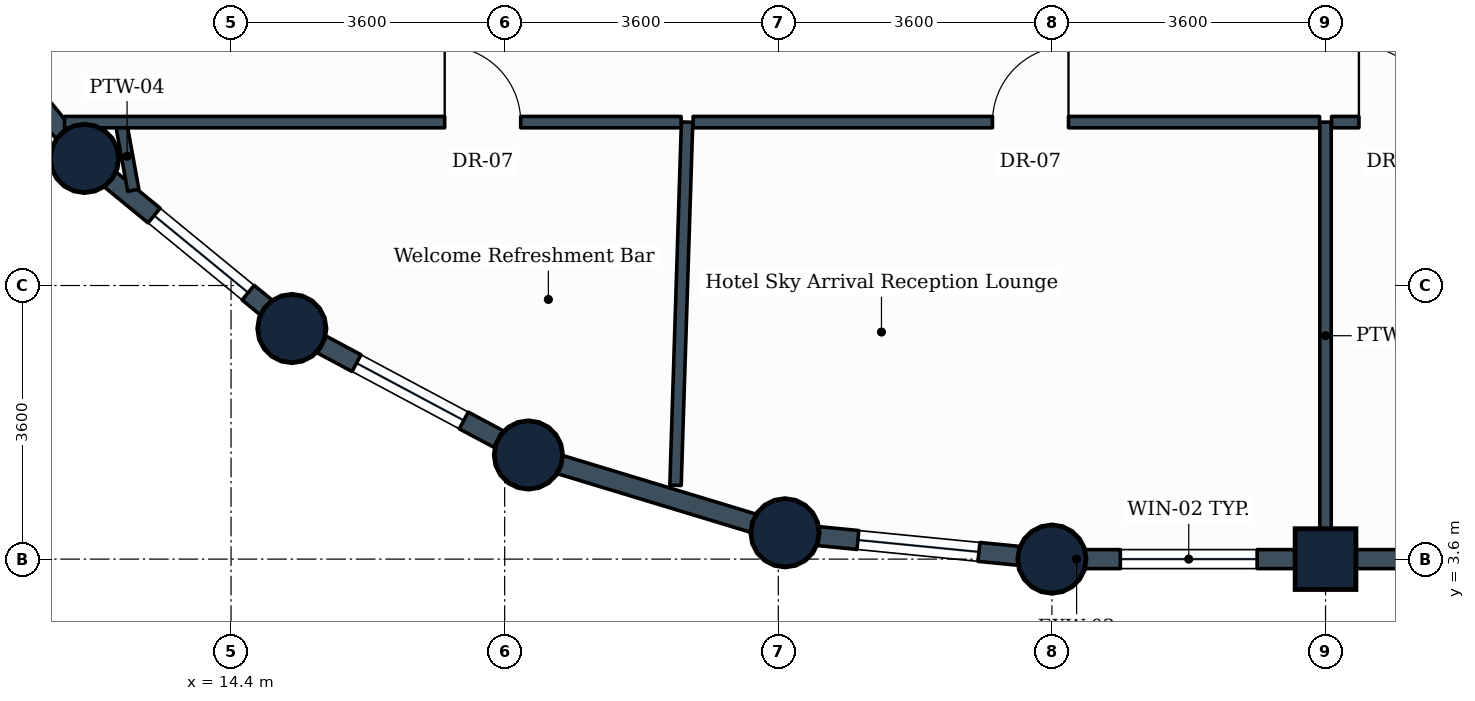
"""IFC4 building model, lengths in metres.
Left out: names, types, materials, properties, quantities, classifications, styles, units other than length and angle.
Written with IfcOpenShell. Run it as: python <this file> out.ifc"""

import sys

from ifc_helpers import new_model, si_unit, direction, frame, frame_2d, origin, origin_2d, place, context, subcontext, project, spatial, rectangle, circle, extrude, element, fill, save


model = new_model("IFC4")
c1 = context("Model", 3, precision=1e-05, world=origin(), true_north=direction((0.0, 1.0)))
c2 = subcontext(c1, "Body", "Model", "MODEL_VIEW")
j1 = project(units=[si_unit("LENGTHUNIT", "METRE"), si_unit("PLANEANGLEUNIT", "RADIAN")], contexts=[c1])
p1 = place(None, origin())
s1 = spatial("IfcSite", under=j1, at=p1, CompositionType="ELEMENT")
p2 = place(p1, origin())
s2 = spatial("IfcBuilding", under=s1, at=p2, CompositionType="ELEMENT")
p3 = place(p2, frame((0.0, 0.0, 221.0)))
s3 = spatial("IfcBuildingStorey", under=s2, at=p3, CompositionType="ELEMENT", Elevation=221.0)
for number, where, z_axis, x_axis in (
    (1, (12.472, 8.872, 0.0), (0.0, 0.0, 1.0), (1.0, 0.0, 0.0)),
    (2, (15.2, 6.634, 0.0), (0.0, 0.0, 1.0), (1.0, 0.0, 0.0)),
    (3, (18.312, 4.97, 0.0), (0.0, 0.0, 1.0), (1.0, 0.0, 0.0)),
    (4, (21.688, 3.946, 0.0), (0.0, 0.0, 1.0), (1.0, 0.0, 0.0)),
    (5, (25.2, 3.6, 0.0), (0.0, 0.0, 1.0), (1.0, 0.0, 0.0)),
):
    element("IfcColumn", number, at=place(p3, frame(where, z_axis=z_axis, x_axis=x_axis)), inside=s3, PredefinedType="COLUMN", context=c2, shape_type="SweptSolid", body=[
        extrude(circle(Radius=0.45, at=origin_2d()), origin(), (0.0, 0.0, 1.0), 3.6),
    ])
p4 = place(p3, frame((28.8, 3.6, 0.0), z_axis=(0.0, 0.0, 1.0), x_axis=(1.0, 0.0, 0.0)))
e6 = element("IfcColumn", 6, at=p4, inside=s3, PredefinedType="COLUMN", context=c2, shape_type="SweptSolid", body=[
    extrude(rectangle(XDim=0.8, YDim=0.8, at=origin_2d()), origin(), (0.0, 0.0, 1.0), 3.6),
])
p5 = place(p3, frame((28.8, 3.6, 0.0), z_axis=(0.0, 0.0, 1.0), x_axis=(-1.0, 0.0, 0.0)))
e7 = element("IfcWall", 7, at=p5, inside=s3, PredefinedType="STANDARD", context=c2, shape_type="SweptSolid", body=[
    extrude(rectangle(XDim=3.6, YDim=0.25, at=frame_2d((1.8, 0.0))), origin(), (0.0, 0.0, 1.0), 2.83),
])
p6 = place(p5, frame((0.9, 0.0, 0.85)))
e8 = element("IfcOpeningElement", 8, at=p6, cuts=e7, PredefinedType="OPENING", context=c2, shape_type="SweptSolid", body=[
    extrude(rectangle(XDim=1.8, YDim=1.35, at=frame_2d((0.9, 0.675))), frame((0.0, 0.135, 0.0), z_axis=(0.0, -1.0, 0.0), x_axis=(1.0, 0.0, 0.0)), (0.0, 0.0, 1.0), 0.27),
])
p7 = place(p3, frame((32.4, 3.6, 0.0), z_axis=(0.0, 0.0, 1.0), x_axis=(-1.0, 0.0, 0.0)))
e9 = element("IfcWall", 9, at=p7, inside=s3, PredefinedType="STANDARD", context=c2, shape_type="SweptSolid", body=[
    extrude(rectangle(XDim=3.6, YDim=0.25, at=frame_2d((1.8, 0.0))), origin(), (0.0, 0.0, 1.0), 2.83),
])
p8 = place(p3, frame((12.472, 8.872, 0.0), z_axis=(0.0, 0.0, 1.0), x_axis=(-0.634258295121, 0.773121216285, 0.0)))
e10 = element("IfcWall", 10, at=p8, inside=s3, PredefinedType="STANDARD", context=c2, shape_type="SweptSolid", body=[
    extrude(rectangle(XDim=3.529, YDim=0.25, at=frame_2d((1.764, 0.0))), origin(), (0.0, 0.0, 1.0), 2.83),
])
p9 = place(p8, frame((0.964, 0.0, 0.85)))
e11 = element("IfcOpeningElement", 11, at=p9, cuts=e10, PredefinedType="OPENING", context=c2, shape_type="SweptSolid", body=[
    extrude(rectangle(XDim=1.6, YDim=1.35, at=frame_2d((0.8, 0.675))), frame((0.0, 0.135, 0.0), z_axis=(0.0, -1.0, 0.0), x_axis=(1.0, 0.0, 0.0)), (0.0, 0.0, 1.0), 0.27),
])
p10 = place(p3, frame((15.2, 6.634, 0.0), z_axis=(0.0, 0.0, 1.0), x_axis=(-0.773121216285, 0.634258295121, 0.0)))
e12 = element("IfcWall", 12, at=p10, inside=s3, PredefinedType="STANDARD", context=c2, shape_type="SweptSolid", body=[
    extrude(rectangle(XDim=3.529, YDim=0.25, at=frame_2d((1.764, 0.0))), origin(), (0.0, 0.0, 1.0), 2.83),
])
p11 = place(p10, frame((0.744, 0.0, 0.85)))
e13 = element("IfcOpeningElement", 13, at=p11, cuts=e12, PredefinedType="OPENING", context=c2, shape_type="SweptSolid", body=[
    extrude(rectangle(XDim=1.6, YDim=1.35, at=frame_2d((0.8, 0.675))), frame((0.0, 0.135, 0.0), z_axis=(0.0, -1.0, 0.0), x_axis=(1.0, 0.0, 0.0)), (0.0, 0.0, 1.0), 0.27),
])
p12 = place(p3, frame((18.312, 4.97, 0.0), z_axis=(0.0, 0.0, 1.0), x_axis=(-0.881846862014, 0.471535907389, 0.0)))
e14 = element("IfcWall", 14, at=p12, inside=s3, PredefinedType="STANDARD", context=c2, shape_type="SweptSolid", body=[
    extrude(rectangle(XDim=3.529, YDim=0.25, at=frame_2d((1.765, 0.0))), origin(), (0.0, 0.0, 1.0), 2.83),
])
p13 = place(p12, frame((0.964, 0.0, 0.85)))
e15 = element("IfcOpeningElement", 15, at=p13, cuts=e14, PredefinedType="OPENING", context=c2, shape_type="SweptSolid", body=[
    extrude(rectangle(XDim=1.6, YDim=1.35, at=frame_2d((0.8, 0.675))), frame((0.0, 0.135, 0.0), z_axis=(0.0, -1.0, 0.0), x_axis=(1.0, 0.0, 0.0)), (0.0, 0.0, 1.0), 0.27),
])
p14 = place(p3, frame((21.688, 3.946, 0.0), z_axis=(0.0, 0.0, 1.0), x_axis=(-0.956953367403, 0.290241714123, 0.0)))
e16 = element("IfcWall", 16, at=p14, inside=s3, PredefinedType="STANDARD", context=c2, shape_type="SweptSolid", body=[
    extrude(rectangle(XDim=3.528, YDim=0.25, at=frame_2d((1.764, 0.0))), origin(), (0.0, 0.0, 1.0), 2.83),
])
p15 = place(p3, frame((25.2, 3.6, 0.0), z_axis=(0.0, 0.0, 1.0), x_axis=(-0.995183369056, 0.098030923459, 0.0)))
e17 = element("IfcWall", 17, at=p15, inside=s3, PredefinedType="STANDARD", context=c2, shape_type="SweptSolid", body=[
    extrude(rectangle(XDim=3.529, YDim=0.25, at=frame_2d((1.765, 0.0))), origin(), (0.0, 0.0, 1.0), 2.83),
])
p16 = place(p15, frame((0.965, 0.0, 0.85)))
e18 = element("IfcOpeningElement", 18, at=p16, cuts=e17, PredefinedType="OPENING", context=c2, shape_type="SweptSolid", body=[
    extrude(rectangle(XDim=1.6, YDim=1.35, at=frame_2d((0.8, 0.675))), frame((0.0, 0.135, 0.0), z_axis=(0.0, -1.0, 0.0), x_axis=(1.0, 0.0, 0.0)), (0.0, 0.0, 1.0), 0.27),
])
p17 = place(p3, frame((28.8, 9.35, 0.0), z_axis=(0.0, 0.0, 1.0), x_axis=(0.0, -1.0, 0.0)))
e19 = element("IfcWall", 19, at=p17, inside=s3, PredefinedType="PARTITIONING", context=c2, shape_type="SweptSolid", body=[
    extrude(rectangle(XDim=5.621, YDim=0.15, at=frame_2d((2.811, 0.0))), origin(), (0.0, 0.0, 1.0), 3.335),
])
p18 = place(p3, frame((12.95, 9.35, 0.0), z_axis=(0.0, 0.0, 1.0), x_axis=(0.179827308786, -0.983698195086, 0.0)))
e20 = element("IfcWall", 20, at=p18, inside=s3, PredefinedType="PARTITIONING", context=c2, shape_type="SweptSolid", body=[
    extrude(rectangle(XDim=0.912, YDim=0.15, at=frame_2d((0.456, 0.0))), origin(), (0.0, 0.0, 1.0), 2.83),
])
p19 = place(p3, frame((20.4, 9.35, 0.0), z_axis=(0.0, 0.0, 1.0), x_axis=(-0.031810202646, -0.999493927449, 0.0)))
e21 = element("IfcWall", 21, at=p19, inside=s3, PredefinedType="PARTITIONING", context=c2, shape_type="SweptSolid", body=[
    extrude(rectangle(XDim=4.781, YDim=0.15, at=frame_2d((2.391, 0.0))), origin(), (0.0, 0.0, 1.0), 2.83),
])
p20 = place(p3, frame((12.209, 9.35, 0.0), z_axis=(0.0, 0.0, 1.0), x_axis=(1.0, 0.0, 0.0)))
e22 = element("IfcWall", 22, at=p20, inside=s3, PredefinedType="PARTITIONING", context=c2, shape_type="SweptSolid", body=[
    extrude(rectangle(XDim=8.112, YDim=0.15, at=frame_2d((4.056, 0.0))), origin(), (0.0, 0.0, 1.0), 2.83),
])
p21 = place(p20, frame((5.002, 0.0, 0.0)))
e23 = element("IfcOpeningElement", 23, at=p21, cuts=e22, PredefinedType="OPENING", context=c2, shape_type="SweptSolid", body=[
    extrude(rectangle(XDim=1.0, YDim=2.1, at=frame_2d((0.5, 1.05))), frame((0.0, 0.085, 0.0), z_axis=(0.0, -1.0, 0.0), x_axis=(1.0, 0.0, 0.0)), (0.0, 0.0, 1.0), 0.17),
])
p22 = place(p3, frame((20.479, 9.35, 0.0), z_axis=(0.0, 0.0, 1.0), x_axis=(1.0, 0.0, 0.0)))
e24 = element("IfcWall", 24, at=p22, inside=s3, PredefinedType="PARTITIONING", context=c2, shape_type="SweptSolid", body=[
    extrude(rectangle(XDim=8.242, YDim=0.15, at=frame_2d((4.121, 0.0))), origin(), (0.0, 0.0, 1.0), 3.02),
])
p23 = place(p22, frame((3.939, 0.0, 0.0)))
e25 = element("IfcOpeningElement", 25, at=p23, cuts=e24, PredefinedType="OPENING", context=c2, shape_type="SweptSolid", body=[
    extrude(rectangle(XDim=1.0, YDim=2.1, at=frame_2d((0.5, 1.05))), frame((0.0, 0.085, 0.0), z_axis=(0.0, -1.0, 0.0), x_axis=(1.0, 0.0, 0.0)), (0.0, 0.0, 1.0), 0.17),
])
p24 = place(p3, frame((28.879, 9.35, 0.0), z_axis=(0.0, 0.0, 1.0), x_axis=(1.0, 0.0, 0.0)))
e26 = element("IfcWall", 26, at=p24, inside=s3, PredefinedType="PARTITIONING", context=c2, shape_type="SweptSolid", body=[
    extrude(rectangle(XDim=5.521, YDim=0.15, at=frame_2d((2.76, 0.0))), origin(), (0.0, 0.0, 1.0), 3.335),
])
p25 = place(p24, frame((0.36, 0.0, 0.0)))
e27 = element("IfcOpeningElement", 27, at=p25, cuts=e26, PredefinedType="OPENING", context=c2, shape_type="SweptSolid", body=[
    extrude(rectangle(XDim=1.0, YDim=2.1, at=frame_2d((0.5, 1.05))), frame((0.0, 0.085, 0.0), z_axis=(0.0, -1.0, 0.0), x_axis=(1.0, 0.0, 0.0)), (0.0, 0.0, 1.0), 0.17),
])
p26 = place(p6, origin())
e28 = element("IfcWindow", 28, at=p26, inside=s3, PartitioningType="SINGLE_PANEL", PredefinedType="WINDOW", context=c2, shape_type="SweptSolid", body=[
    extrude(rectangle(XDim=1.8, YDim=1.35, at=frame_2d((0.9, 0.675))), frame((0.0, 0.03, 0.0), z_axis=(0.0, -1.0, 0.0), x_axis=(1.0, 0.0, 0.0)), (0.0, 0.0, 1.0), 0.06),
])
fill(e8, e28)
p27 = place(p11, origin())
e29 = element("IfcWindow", 29, at=p27, inside=s3, PartitioningType="SINGLE_PANEL", PredefinedType="WINDOW", context=c2, shape_type="SweptSolid", body=[
    extrude(rectangle(XDim=1.6, YDim=1.35, at=frame_2d((0.8, 0.675))), frame((0.0, 0.03, 0.0), z_axis=(0.0, -1.0, 0.0), x_axis=(1.0, 0.0, 0.0)), (0.0, 0.0, 1.0), 0.06),
])
fill(e13, e29)
p28 = place(p13, origin())
e30 = element("IfcWindow", 30, at=p28, inside=s3, PartitioningType="SINGLE_PANEL", PredefinedType="WINDOW", context=c2, shape_type="SweptSolid", body=[
    extrude(rectangle(XDim=1.6, YDim=1.35, at=frame_2d((0.8, 0.675))), frame((0.0, 0.03, 0.0), z_axis=(0.0, -1.0, 0.0), x_axis=(1.0, 0.0, 0.0)), (0.0, 0.0, 1.0), 0.06),
])
fill(e15, e30)
p29 = place(p16, origin())
e31 = element("IfcWindow", 31, at=p29, inside=s3, PartitioningType="SINGLE_PANEL", PredefinedType="WINDOW", context=c2, shape_type="SweptSolid", body=[
    extrude(rectangle(XDim=1.6, YDim=1.35, at=frame_2d((0.8, 0.675))), frame((0.0, 0.03, 0.0), z_axis=(0.0, -1.0, 0.0), x_axis=(1.0, 0.0, 0.0)), (0.0, 0.0, 1.0), 0.06),
])
fill(e18, e31)
p30 = place(p21, origin())
e32 = element("IfcDoor", 32, at=p30, inside=s3, OperationType="SINGLE_SWING_LEFT", PredefinedType="DOOR", context=c2, shape_type="SweptSolid", body=[
    extrude(rectangle(XDim=1.0, YDim=2.1, at=frame_2d((0.5, 1.05))), frame((0.0, 0.025, 0.0), z_axis=(0.0, -1.0, 0.0), x_axis=(1.0, 0.0, 0.0)), (0.0, 0.0, 1.0), 0.05),
])
fill(e23, e32)
p31 = place(p23, origin())
e33 = element("IfcDoor", 33, at=p31, inside=s3, OperationType="SINGLE_SWING_RIGHT", PredefinedType="DOOR", context=c2, shape_type="SweptSolid", body=[
    extrude(rectangle(XDim=1.0, YDim=2.1, at=frame_2d((0.5, 1.05))), frame((0.0, 0.025, 0.0), z_axis=(0.0, -1.0, 0.0), x_axis=(1.0, 0.0, 0.0)), (0.0, 0.0, 1.0), 0.05),
])
fill(e25, e33)
p32 = place(p25, origin())
e34 = element("IfcDoor", 34, at=p32, inside=s3, OperationType="SINGLE_SWING_LEFT", PredefinedType="DOOR", context=c2, shape_type="SweptSolid", body=[
    extrude(rectangle(XDim=1.0, YDim=2.1, at=frame_2d((0.5, 1.05))), frame((0.0, 0.025, 0.0), z_axis=(0.0, -1.0, 0.0), x_axis=(1.0, 0.0, 0.0)), (0.0, 0.0, 1.0), 0.05),
])
fill(e27, e34)
save(model, sys.argv[1])
